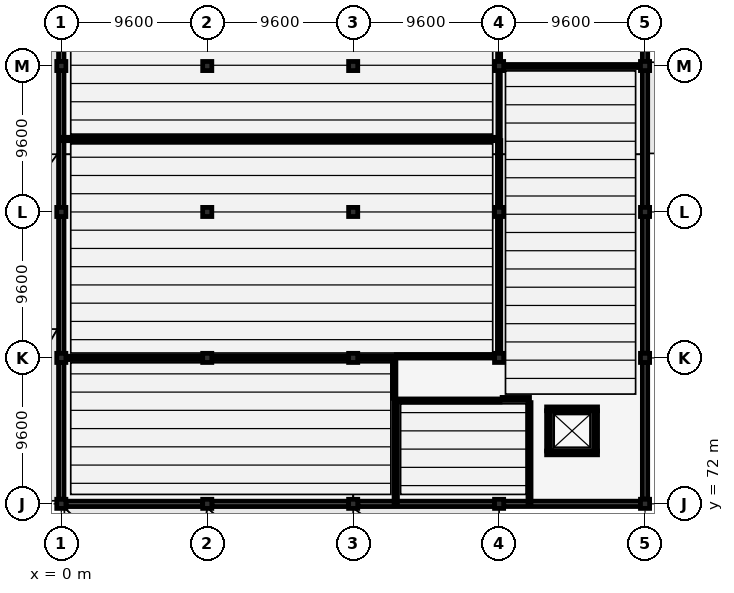
"""IFC4 building model, lengths in metres.
Left out: names, types, materials, properties, quantities, classifications, styles, units other than length and angle.
Written with IfcOpenShell. Run it as: python <this file> out.ifc"""

import sys

from ifc_helpers import new_model, si_unit, direction, frame, frame_2d, origin, origin_2d, place, context, subcontext, project, spatial, rectangle, extrude, element, fill, save


model = new_model("IFC4")
c1 = context("Model", 3, precision=1e-05, world=origin(), true_north=direction((0.0, 1.0)))
c2 = subcontext(c1, "Body", "Model", "MODEL_VIEW")
j1 = project(units=[si_unit("LENGTHUNIT", "METRE"), si_unit("PLANEANGLEUNIT", "RADIAN")], contexts=[c1])
p1 = place(None, origin())
s1 = spatial("IfcSite", under=j1, at=p1, CompositionType="ELEMENT")
p2 = place(p1, origin())
s2 = spatial("IfcBuilding", under=s1, at=p2, CompositionType="ELEMENT")
p3 = place(p2, origin())
s3 = spatial("IfcBuildingStorey", under=s2, at=p3, CompositionType="ELEMENT", Elevation=0.0)
for number, where, z_axis, x_axis in (
    (1, (0.0, 72.0, 0.0), (0.0, 0.0, 1.0), (1.0, 0.0, 0.0)),
    (2, (0.0, 81.6, 0.0), (0.0, 0.0, 1.0), (1.0, 0.0, 0.0)),
    (3, (0.0, 91.2, 0.0), (0.0, 0.0, 1.0), (1.0, 0.0, 0.0)),
    (4, (0.0, 100.8, 0.0), (0.0, 0.0, 1.0), (1.0, 0.0, 0.0)),
    (5, (9.6, 72.0, 0.0), (0.0, 0.0, 1.0), (1.0, 0.0, 0.0)),
    (6, (9.6, 81.6, 0.0), (0.0, 0.0, 1.0), (1.0, 0.0, 0.0)),
    (7, (9.6, 91.2, 0.0), (0.0, 0.0, 1.0), (1.0, 0.0, 0.0)),
    (8, (9.6, 100.8, 0.0), (0.0, 0.0, 1.0), (1.0, 0.0, 0.0)),
    (9, (19.2, 72.0, 0.0), (0.0, 0.0, 1.0), (1.0, 0.0, 0.0)),
    (10, (19.2, 81.6, 0.0), (0.0, 0.0, 1.0), (1.0, 0.0, 0.0)),
    (11, (19.2, 91.2, 0.0), (0.0, 0.0, 1.0), (1.0, 0.0, 0.0)),
    (12, (19.2, 100.8, 0.0), (0.0, 0.0, 1.0), (1.0, 0.0, 0.0)),
    (13, (28.8, 72.0, 0.0), (0.0, 0.0, 1.0), (1.0, 0.0, 0.0)),
    (14, (28.8, 81.6, 0.0), (0.0, 0.0, 1.0), (1.0, 0.0, 0.0)),
    (15, (28.8, 91.2, 0.0), (0.0, 0.0, 1.0), (1.0, 0.0, 0.0)),
    (16, (28.8, 100.8, 0.0), (0.0, 0.0, 1.0), (1.0, 0.0, 0.0)),
    (17, (38.4, 72.0, 0.0), (0.0, 0.0, 1.0), (1.0, 0.0, 0.0)),
    (18, (38.4, 81.6, 0.0), (0.0, 0.0, 1.0), (1.0, 0.0, 0.0)),
    (19, (38.4, 91.2, 0.0), (0.0, 0.0, 1.0), (1.0, 0.0, 0.0)),
    (20, (38.4, 100.8, 0.0), (0.0, 0.0, 1.0), (1.0, 0.0, 0.0)),
):
    element("IfcColumn", number, at=place(p3, frame(where, z_axis=z_axis, x_axis=x_axis)), inside=s3, PredefinedType="COLUMN", context=c2, shape_type="SweptSolid", body=[
        extrude(rectangle(XDim=0.6, YDim=0.6, at=origin_2d()), origin(), (0.0, 0.0, 1.0), 4.8),
    ])
for number, where, z_axis, x_axis in (
    (21, (0.3, 72.0, 0.0), (0.0, 0.0, 1.0), (1.0, 0.0, 0.0)),
    (22, (9.9, 72.0, 0.0), (0.0, 0.0, 1.0), (1.0, 0.0, 0.0)),
):
    element("IfcWall", number, at=place(p3, frame(where, z_axis=z_axis, x_axis=x_axis)), inside=s3, PredefinedType="SOLIDWALL", context=c2, shape_type="SweptSolid", body=[
        extrude(rectangle(XDim=9.0, YDim=0.35, at=frame_2d((4.5, 0.0))), origin(), (0.0, 0.0, 1.0), 4.1),
    ])
p4 = place(p3, frame((19.5, 72.0, 0.0), z_axis=(0.0, 0.0, 1.0), x_axis=(1.0, 0.0, 0.0)))
e23 = element("IfcWall", 23, at=p4, inside=s3, PredefinedType="SOLIDWALL", context=c2, shape_type="SweptSolid", body=[
    extrude(rectangle(XDim=9.0, YDim=0.35, at=frame_2d((4.5, 0.0))), origin(), (0.0, 0.0, 1.0), 4.1),
])
p5 = place(p4, frame((3.1, 0.0, 0.0)))
e24 = element("IfcOpeningElement", 24, at=p5, cuts=e23, PredefinedType="OPENING", context=c2, shape_type="SweptSolid", body=[
    extrude(rectangle(XDim=1.1, YDim=2.2, at=frame_2d((0.55, 1.1))), frame((0.0, 0.185, 0.0), z_axis=(0.0, -1.0, 0.0), x_axis=(1.0, 0.0, 0.0)), (0.0, 0.0, 1.0), 0.37),
])
p6 = place(p4, frame((5.2, 0.0, 1.1)))
e25 = element("IfcOpeningElement", 25, at=p6, cuts=e23, PredefinedType="OPENING", context=c2, shape_type="SweptSolid", body=[
    extrude(rectangle(XDim=1.6, YDim=1.2, at=frame_2d((0.8, 0.6))), frame((0.0, 0.185, 0.0), z_axis=(0.0, -1.0, 0.0), x_axis=(1.0, 0.0, 0.0)), (0.0, 0.0, 1.0), 0.37),
])
p7 = place(p3, frame((29.1, 72.0, 0.0), z_axis=(0.0, 0.0, 1.0), x_axis=(1.0, 0.0, 0.0)))
e26 = element("IfcWall", 26, at=p7, inside=s3, PredefinedType="SOLIDWALL", context=c2, shape_type="SweptSolid", body=[
    extrude(rectangle(XDim=9.0, YDim=0.35, at=frame_2d((4.5, 0.0))), origin(), (0.0, 0.0, 1.0), 4.1),
])
p8 = place(p7, frame((3.4, 0.0, 0.0)))
e27 = element("IfcOpeningElement", 27, at=p8, cuts=e26, PredefinedType="OPENING", context=c2, shape_type="SweptSolid", body=[
    extrude(rectangle(XDim=1.76, YDim=2.37, at=frame_2d((0.88, 1.185))), frame((0.0, 0.185, 0.0), z_axis=(0.0, -1.0, 0.0), x_axis=(1.0, 0.0, 0.0)), (0.0, 0.0, 1.0), 0.37),
])
for number, where, z_axis, x_axis in (
    (28, (0.0, 72.3, 0.0), (0.0, 0.0, 1.0), (0.0, 1.0, 0.0)),
    (29, (38.4, 72.3, 0.0), (0.0, 0.0, 1.0), (0.0, 1.0, 0.0)),
    (30, (0.0, 81.9, 0.0), (0.0, 0.0, 1.0), (0.0, 1.0, 0.0)),
):
    element("IfcWall", number, at=place(p3, frame(where, z_axis=z_axis, x_axis=x_axis)), inside=s3, PredefinedType="SOLIDWALL", context=c2, shape_type="SweptSolid", body=[
        extrude(rectangle(XDim=9.0, YDim=0.35, at=frame_2d((4.5, 0.0))), origin(), (0.0, 0.0, 1.0), 4.1),
    ])
p9 = place(p3, frame((38.4, 81.9, 0.0), z_axis=(0.0, 0.0, 1.0), x_axis=(0.0, 1.0, 0.0)))
e31 = element("IfcWall", 31, at=p9, inside=s3, PredefinedType="SOLIDWALL", context=c2, shape_type="SweptSolid", body=[
    extrude(rectangle(XDim=9.0, YDim=0.35, at=frame_2d((4.5, 0.0))), origin(), (0.0, 0.0, 1.0), 4.1),
])
p10 = place(p9, frame((3.6, 0.0, 0.0)))
e32 = element("IfcOpeningElement", 32, at=p10, cuts=e31, PredefinedType="OPENING", context=c2, shape_type="SweptSolid", body=[
    extrude(rectangle(XDim=1.1, YDim=2.2, at=frame_2d((0.55, 1.1))), frame((0.0, 0.185, 0.0), z_axis=(0.0, -1.0, 0.0), x_axis=(1.0, 0.0, 0.0)), (0.0, 0.0, 1.0), 0.37),
])
for number, where, z_axis, x_axis in (
    (33, (0.0, 91.5, 0.0), (0.0, 0.0, 1.0), (0.0, 1.0, 0.0)),
    (34, (38.4, 91.5, 0.0), (0.0, 0.0, 1.0), (0.0, 1.0, 0.0)),
):
    element("IfcWall", number, at=place(p3, frame(where, z_axis=z_axis, x_axis=x_axis)), inside=s3, PredefinedType="SOLIDWALL", context=c2, shape_type="SweptSolid", body=[
        extrude(rectangle(XDim=9.0, YDim=0.35, at=frame_2d((4.5, 0.0))), origin(), (0.0, 0.0, 1.0), 4.1),
    ])
for number, where, z_axis, x_axis in (
    (35, (0.0, 101.1, 0.0), (0.0, 0.0, 1.0), (0.0, 1.0, 0.0)),
    (36, (38.4, 101.1, 0.0), (0.0, 0.0, 1.0), (0.0, 1.0, 0.0)),
):
    element("IfcWall", number, at=place(p3, frame(where, z_axis=z_axis, x_axis=x_axis)), inside=s3, PredefinedType="SOLIDWALL", context=c2, shape_type="SweptSolid", body=[
        extrude(rectangle(XDim=8.2, YDim=0.35, at=frame_2d((4.1, 0.0))), origin(), (0.0, 0.0, 1.0), 4.1),
    ])
p11 = place(p2, frame((0.0, 0.0, -4.2)))
s4 = spatial("IfcBuildingStorey", under=s2, at=p11, CompositionType="ELEMENT", Elevation=-4.2)
for number, where, z_axis, x_axis in (
    (37, (38.575, 89.0, 0.0), (0.0, 0.0, 1.0), (1.0, 0.0, 0.0)),
    (38, (38.575, 95.0, 0.0), (0.0, 0.0, 1.0), (1.0, 0.0, 0.0)),
):
    element("IfcWall", number, at=place(p11, frame(where, z_axis=z_axis, x_axis=x_axis)), inside=s4, PredefinedType="SOLIDWALL", context=c2, shape_type="SweptSolid", body=[
        extrude(rectangle(XDim=9.25, YDim=0.4, at=frame_2d((4.625, 0.0))), origin(), (0.0, 0.0, 1.0), 9.0),
    ])
for number, where, z_axis, x_axis in (
    (39, (35.275, 75.35, 0.0), (0.0, 0.0, 1.0), (-1.0, 0.0, 0.0)),
    (40, (31.925, 78.25, 0.0), (0.0, 0.0, 1.0), (1.0, 0.0, 0.0)),
):
    element("IfcWall", number, at=place(p3, frame(where, z_axis=z_axis, x_axis=x_axis)), inside=s3, PredefinedType="SOLIDWALL", context=c2, shape_type="SweptSolid", body=[
        extrude(rectangle(XDim=3.35, YDim=0.25, at=frame_2d((1.675, 0.0))), origin(), (0.0, 0.0, 1.0), 4.55),
    ])
p12 = place(p3, frame((32.05, 75.475, 0.0), z_axis=(0.0, 0.0, 1.0), x_axis=(0.0, 1.0, 0.0)))
e41 = element("IfcWall", 41, at=p12, inside=s3, PredefinedType="SOLIDWALL", context=c2, shape_type="SweptSolid", body=[
    extrude(rectangle(XDim=2.65, YDim=0.25, at=frame_2d((1.325, 0.0))), origin(), (0.0, 0.0, 1.0), 4.55),
])
p13 = place(p12, frame((0.425, 0.0, 0.0)))
e42 = element("IfcOpeningElement", 42, at=p13, cuts=e41, PredefinedType="OPENING", context=c2, shape_type="SweptSolid", body=[
    extrude(rectangle(XDim=1.8, YDim=2.3, at=frame_2d((0.9, 1.15))), frame((0.0, 0.135, 0.0), z_axis=(0.0, -1.0, 0.0), x_axis=(1.0, 0.0, 0.0)), (0.0, 0.0, 1.0), 0.27),
])
p14 = place(p3, frame((35.15, 78.125, 0.0), z_axis=(0.0, 0.0, 1.0), x_axis=(0.0, -1.0, 0.0)))
e43 = element("IfcWall", 43, at=p14, inside=s3, PredefinedType="SOLIDWALL", context=c2, shape_type="SweptSolid", body=[
    extrude(rectangle(XDim=2.65, YDim=0.25, at=frame_2d((1.325, 0.0))), origin(), (0.0, 0.0, 1.0), 4.55),
])
p15 = place(p3, frame((0.05, 96.0, 0.0), z_axis=(0.0, 0.0, 1.0), x_axis=(1.0, 0.0, 0.0)))
e44 = element("IfcWall", 44, at=p15, inside=s3, PredefinedType="PARTITIONING", context=c2, shape_type="SweptSolid", body=[
    extrude(rectangle(XDim=28.55, YDim=0.22, at=frame_2d((14.275, 0.0))), origin(), (0.0, 0.0, 1.0), 4.4),
])
p16 = place(p3, frame((28.8, 100.9, 0.0), z_axis=(0.0, 0.0, 1.0), x_axis=(0.0, 1.0, 0.0)))
e45 = element("IfcWall", 45, at=p16, inside=s3, PredefinedType="PARTITIONING", context=c2, shape_type="SweptSolid", body=[
    extrude(rectangle(XDim=17.05, YDim=0.2, at=frame_2d((8.525, 0.0))), origin(), (0.0, 0.0, 1.0), 3.69),
])
p17 = place(p3, frame((28.8, 96.1, 0.0), z_axis=(0.0, 0.0, 1.0), x_axis=(0.0, 1.0, 0.0)))
e46 = element("IfcWall", 46, at=p17, inside=s3, PredefinedType="PARTITIONING", context=c2, shape_type="SweptSolid", body=[
    extrude(rectangle(XDim=4.6, YDim=0.16, at=frame_2d((2.3, 0.0))), origin(), (0.0, 0.0, 1.0), 3.69),
])
p18 = place(p17, frame((1.4, 0.0, 0.0)))
e47 = element("IfcOpeningElement", 47, at=p18, cuts=e46, PredefinedType="OPENING", context=c2, shape_type="SweptSolid", body=[
    extrude(rectangle(XDim=1.8, YDim=2.15, at=frame_2d((0.9, 1.075))), frame((0.0, 0.09, 0.0), z_axis=(0.0, -1.0, 0.0), x_axis=(1.0, 0.0, 0.0)), (0.0, 0.0, 1.0), 0.18),
])
p19 = place(p3, frame((0.05, 81.6, 0.0), z_axis=(0.0, 0.0, 1.0), x_axis=(1.0, 0.0, 0.0)))
e48 = element("IfcWall", 48, at=p19, inside=s3, PredefinedType="PARTITIONING", context=c2, shape_type="SweptSolid", body=[
    extrude(rectangle(XDim=21.85, YDim=0.22, at=frame_2d((10.925, 0.0))), origin(), (0.0, 0.0, 1.0), 3.75),
])
p20 = place(p3, frame((28.8, 81.7, 0.0), z_axis=(0.0, 0.0, 1.0), x_axis=(0.0, 1.0, 0.0)))
e49 = element("IfcWall", 49, at=p20, inside=s3, PredefinedType="PARTITIONING", context=c2, shape_type="SweptSolid", body=[
    extrude(rectangle(XDim=14.2, YDim=0.22, at=frame_2d((7.1, 0.0))), origin(), (0.0, 0.0, 1.0), 3.69),
])
p21 = place(p20, frame((6.35, 0.0, 0.0)))
e50 = element("IfcOpeningElement", 50, at=p21, cuts=e49, PredefinedType="OPENING", context=c2, shape_type="SweptSolid", body=[
    extrude(rectangle(XDim=1.5, YDim=2.2, at=frame_2d((0.75, 1.1))), frame((0.0, 0.12, 0.0), z_axis=(0.0, -1.0, 0.0), x_axis=(1.0, 0.0, 0.0)), (0.0, 0.0, 1.0), 0.24),
])
p22 = place(p3, frame((22.0, 72.05, 0.0), z_axis=(0.0, 0.0, 1.0), x_axis=(0.0, 1.0, 0.0)))
e51 = element("IfcWall", 51, at=p22, inside=s3, PredefinedType="PARTITIONING", context=c2, shape_type="SweptSolid", body=[
    extrude(rectangle(XDim=6.75, YDim=0.22, at=frame_2d((3.375, 0.0))), origin(), (0.0, 0.0, 1.0), 4.4),
])
p23 = place(p3, frame((29.0, 78.9, 0.0), z_axis=(0.0, 0.0, 1.0), x_axis=(1.0, 0.0, 0.0)))
e52 = element("IfcWall", 52, at=p23, inside=s3, PredefinedType="PARTITIONING", context=c2, shape_type="SweptSolid", body=[
    extrude(rectangle(XDim=1.8, YDim=0.2, at=frame_2d((0.9, 0.0))), origin(), (0.0, 0.0, 1.0), 4.4),
])
p24 = place(p3, frame((29.0, 100.8, 0.0), z_axis=(0.0, 0.0, 1.0), x_axis=(1.0, 0.0, 0.0)))
e53 = element("IfcWall", 53, at=p24, inside=s3, PredefinedType="PARTITIONING", context=c2, shape_type="SweptSolid", body=[
    extrude(rectangle(XDim=9.35, YDim=0.2, at=frame_2d((4.675, 0.0))), origin(), (0.0, 0.0, 1.0), 3.75),
])
p25 = place(p24, frame((3.875, 0.0, 0.0)))
e54 = element("IfcOpeningElement", 54, at=p25, cuts=e53, PredefinedType="OPENING", context=c2, shape_type="SweptSolid", body=[
    extrude(rectangle(XDim=1.6, YDim=2.2, at=frame_2d((0.8, 1.1))), frame((0.0, 0.11, 0.0), z_axis=(0.0, -1.0, 0.0), x_axis=(1.0, 0.0, 0.0)), (0.0, 0.0, 1.0), 0.22),
])
p26 = place(p3, frame((22.04, 81.7, 0.0), z_axis=(0.0, 0.0, 1.0), x_axis=(1.0, 0.0, 0.0)))
e55 = element("IfcWall", 55, at=p26, inside=s3, PredefinedType="PARTITIONING", context=c2, shape_type="SweptSolid", body=[
    extrude(rectangle(XDim=6.42, YDim=0.22, at=frame_2d((3.21, 0.0))), origin(), (0.0, 0.0, 1.0), 3.75),
])
p27 = place(p3, frame((21.9, 78.94, 0.0), z_axis=(0.0, 0.0, 1.0), x_axis=(0.0, 1.0, 0.0)))
e56 = element("IfcWall", 56, at=p27, inside=s3, PredefinedType="PARTITIONING", context=c2, shape_type="SweptSolid", body=[
    extrude(rectangle(XDim=2.42, YDim=0.22, at=frame_2d((1.21, 0.0))), origin(), (0.0, 0.0, 1.0), 4.4),
])
p28 = place(p27, frame((0.71, 0.0, 0.0)))
e57 = element("IfcOpeningElement", 57, at=p28, cuts=e56, PredefinedType="OPENING", context=c2, shape_type="SweptSolid", body=[
    extrude(rectangle(XDim=1.0, YDim=2.15, at=frame_2d((0.5, 1.075))), frame((0.0, 0.12, 0.0), z_axis=(0.0, -1.0, 0.0), x_axis=(1.0, 0.0, 0.0)), (0.0, 0.0, 1.0), 0.24),
])
p29 = place(p3, frame((22.24, 78.8, 0.0), z_axis=(0.0, 0.0, 1.0), x_axis=(1.0, 0.0, 0.0)))
e58 = element("IfcWall", 58, at=p29, inside=s3, PredefinedType="PARTITIONING", context=c2, shape_type="SweptSolid", body=[
    extrude(rectangle(XDim=6.62, YDim=0.2, at=frame_2d((3.31, 0.0))), origin(), (0.0, 0.0, 1.0), 4.033),
])
p30 = place(p29, frame((2.81, 0.0, 0.0)))
e59 = element("IfcOpeningElement", 59, at=p30, cuts=e58, PredefinedType="OPENING", context=c2, shape_type="SweptSolid", body=[
    extrude(rectangle(XDim=1.0, YDim=2.15, at=frame_2d((0.5, 1.075))), frame((0.0, 0.11, 0.0), z_axis=(0.0, -1.0, 0.0), x_axis=(1.0, 0.0, 0.0)), (0.0, 0.0, 1.0), 0.22),
])
p31 = place(p3, frame((30.8, 72.05, 0.0), z_axis=(0.0, 0.0, 1.0), x_axis=(0.0, 1.0, 0.0)))
e60 = element("IfcWall", 60, at=p31, inside=s3, PredefinedType="PARTITIONING", context=c2, shape_type="SweptSolid", body=[
    extrude(rectangle(XDim=6.61, YDim=0.2, at=frame_2d((3.305, 0.0))), origin(), (0.0, 0.0, 1.0), 4.4),
])
p32 = place(p5, origin())
e61 = element("IfcDoor", 61, at=p32, inside=s3, OperationType="SINGLE_SWING_RIGHT", PredefinedType="DOOR", context=c2, shape_type="SweptSolid", body=[
    extrude(rectangle(XDim=1.1, YDim=2.2, at=frame_2d((0.55, 1.1))), frame((0.0, 0.025, 0.0), z_axis=(0.0, -1.0, 0.0), x_axis=(1.0, 0.0, 0.0)), (0.0, 0.0, 1.0), 0.05),
])
fill(e24, e61)
p33 = place(p6, origin())
e62 = element("IfcWindow", 62, at=p33, inside=s3, PartitioningType="SINGLE_PANEL", PredefinedType="WINDOW", context=c2, shape_type="SweptSolid", body=[
    extrude(rectangle(XDim=1.6, YDim=1.2, at=frame_2d((0.8, 0.6))), frame((0.0, 0.03, 0.0), z_axis=(0.0, -1.0, 0.0), x_axis=(1.0, 0.0, 0.0)), (0.0, 0.0, 1.0), 0.06),
])
fill(e25, e62)
p34 = place(p8, origin())
e63 = element("IfcDoor", 63, at=p34, inside=s3, OperationType="DOUBLE_DOOR_SINGLE_SWING", PredefinedType="DOOR", context=c2, shape_type="SweptSolid", body=[
    extrude(rectangle(XDim=1.76, YDim=2.37, at=frame_2d((0.88, 1.185))), frame((0.0, 0.025, 0.0), z_axis=(0.0, -1.0, 0.0), x_axis=(1.0, 0.0, 0.0)), (0.0, 0.0, 1.0), 0.05),
])
fill(e27, e63)
p35 = place(p10, origin())
e64 = element("IfcDoor", 64, at=p35, inside=s3, OperationType="SINGLE_SWING_RIGHT", PredefinedType="DOOR", context=c2, shape_type="SweptSolid", body=[
    extrude(rectangle(XDim=1.1, YDim=2.2, at=frame_2d((0.55, 1.1))), frame((0.0, 0.025, 0.0), z_axis=(0.0, -1.0, 0.0), x_axis=(1.0, 0.0, 0.0)), (0.0, 0.0, 1.0), 0.05),
])
fill(e32, e64)
p36 = place(p13, origin())
e65 = element("IfcDoor", 65, at=p36, inside=s3, OperationType="DOUBLE_DOOR_SLIDING", PredefinedType="DOOR", context=c2, shape_type="SweptSolid", body=[
    extrude(rectangle(XDim=1.8, YDim=2.3, at=frame_2d((0.9, 1.15))), frame((0.0, 0.025, 0.0), z_axis=(0.0, -1.0, 0.0), x_axis=(1.0, 0.0, 0.0)), (0.0, 0.0, 1.0), 0.05),
])
fill(e42, e65)
p37 = place(p18, origin())
e66 = element("IfcDoor", 66, at=p37, inside=s3, OperationType="DOUBLE_DOOR_SINGLE_SWING", PredefinedType="DOOR", context=c2, shape_type="SweptSolid", body=[
    extrude(rectangle(XDim=1.8, YDim=2.15, at=frame_2d((0.9, 1.075))), frame((0.0, 0.025, 0.0), z_axis=(0.0, -1.0, 0.0), x_axis=(1.0, 0.0, 0.0)), (0.0, 0.0, 1.0), 0.05),
])
fill(e47, e66)
p38 = place(p21, origin())
e67 = element("IfcDoor", 67, at=p38, inside=s3, OperationType="SLIDING_TO_RIGHT", PredefinedType="DOOR", context=c2, shape_type="SweptSolid", body=[
    extrude(rectangle(XDim=1.5, YDim=2.2, at=frame_2d((0.75, 1.1))), frame((0.0, 0.025, 0.0), z_axis=(0.0, -1.0, 0.0), x_axis=(1.0, 0.0, 0.0)), (0.0, 0.0, 1.0), 0.05),
])
fill(e50, e67)
p39 = place(p25, origin())
e68 = element("IfcDoor", 68, at=p39, inside=s3, OperationType="DOUBLE_DOOR_SINGLE_SWING", PredefinedType="DOOR", context=c2, shape_type="SweptSolid", body=[
    extrude(rectangle(XDim=1.6, YDim=2.2, at=frame_2d((0.8, 1.1))), frame((0.0, 0.025, 0.0), z_axis=(0.0, -1.0, 0.0), x_axis=(1.0, 0.0, 0.0)), (0.0, 0.0, 1.0), 0.05),
])
fill(e54, e68)
p40 = place(p28, origin())
e69 = element("IfcDoor", 69, at=p40, inside=s3, OperationType="SINGLE_SWING_LEFT", PredefinedType="DOOR", context=c2, shape_type="SweptSolid", body=[
    extrude(rectangle(XDim=1.0, YDim=2.15, at=frame_2d((0.5, 1.075))), frame((0.0, 0.025, 0.0), z_axis=(0.0, -1.0, 0.0), x_axis=(1.0, 0.0, 0.0)), (0.0, 0.0, 1.0), 0.05),
])
fill(e57, e69)
p41 = place(p30, origin())
e70 = element("IfcDoor", 70, at=p41, inside=s3, OperationType="SINGLE_SWING_RIGHT", PredefinedType="DOOR", context=c2, shape_type="SweptSolid", body=[
    extrude(rectangle(XDim=1.0, YDim=2.15, at=frame_2d((0.5, 1.075))), frame((0.0, 0.025, 0.0), z_axis=(0.0, -1.0, 0.0), x_axis=(1.0, 0.0, 0.0)), (0.0, 0.0, 1.0), 0.05),
])
fill(e59, e70)
save(model, sys.argv[1])
